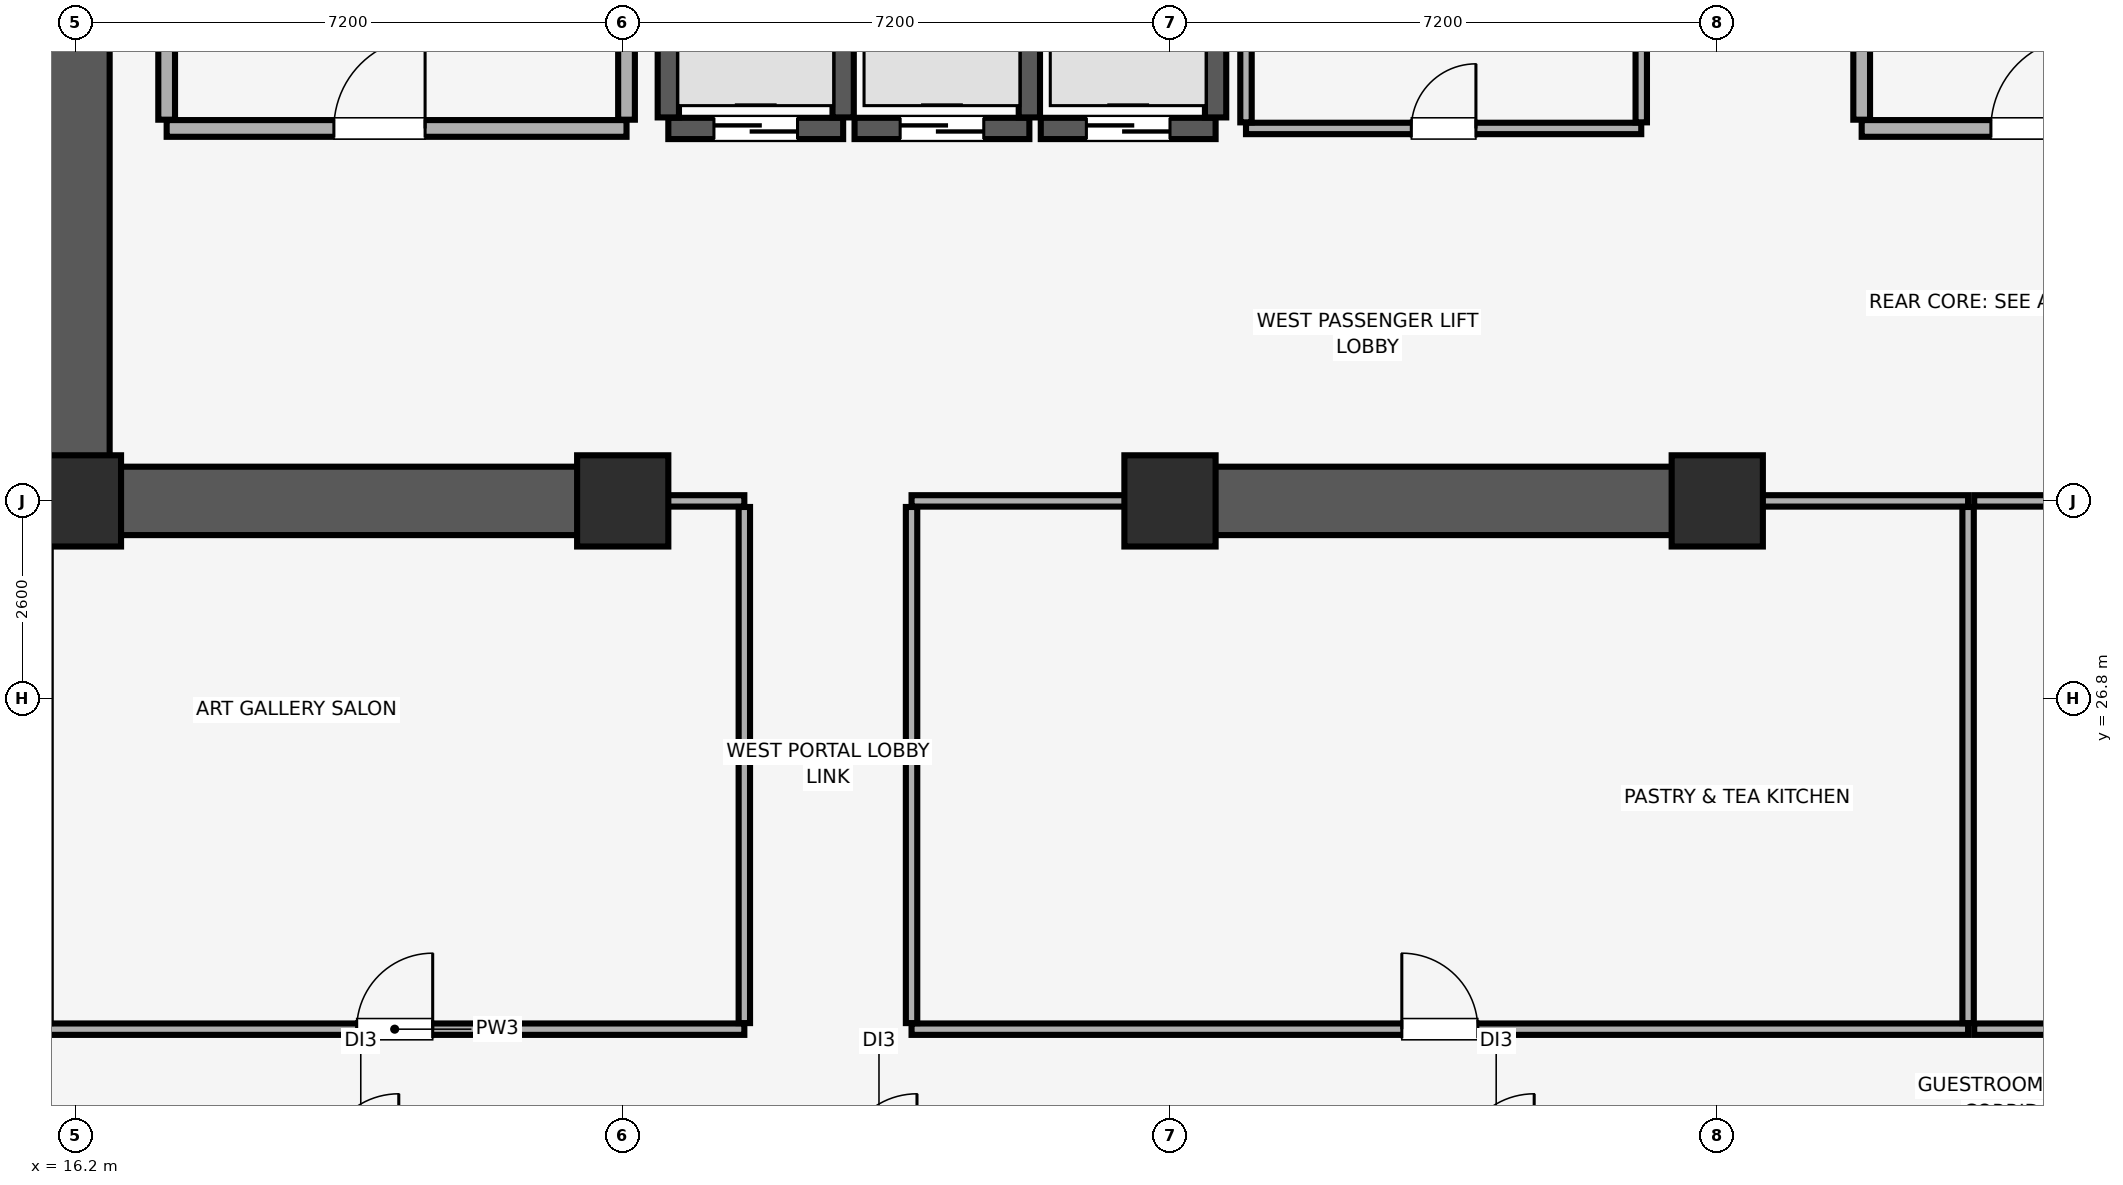
"""IFC4 building model, lengths in metres.
Left out: names, types, materials, properties, quantities, classifications, styles, units other than length and angle.
Written with IfcOpenShell. Run it as: python <this file> out.ifc"""

import sys

from ifc_helpers import new_model, si_unit, direction, frame, frame_2d, origin, origin_2d, place, context, subcontext, project, spatial, rectangle, extrude, element, fill, save


model = new_model("IFC4")
c1 = context("Model", 3, precision=1e-05, world=origin(), true_north=direction((0.0, 1.0)))
c2 = subcontext(c1, "Body", "Model", "MODEL_VIEW")
j1 = project(units=[si_unit("LENGTHUNIT", "METRE"), si_unit("PLANEANGLEUNIT", "RADIAN")], contexts=[c1])
p1 = place(None, origin())
s1 = spatial("IfcSite", under=j1, at=p1, CompositionType="ELEMENT")
p2 = place(p1, origin())
s2 = spatial("IfcBuilding", under=s1, at=p2, CompositionType="ELEMENT")
p3 = place(p2, frame((0.0, 0.0, 93.05)))
s3 = spatial("IfcBuildingStorey", under=s2, at=p3, CompositionType="ELEMENT", Elevation=93.05)
for number, where, z_axis, x_axis in (
    (1, (16.2, 29.4, 0.0), (0.0, 0.0, 1.0), (1.0, 0.0, 0.0)),
    (2, (23.4, 29.4, 0.0), (0.0, 0.0, 1.0), (1.0, 0.0, 0.0)),
    (3, (30.6, 29.4, 0.0), (0.0, 0.0, 1.0), (1.0, 0.0, 0.0)),
    (4, (37.8, 29.4, 0.0), (0.0, 0.0, 1.0), (1.0, 0.0, 0.0)),
):
    element("IfcColumn", number, at=place(p3, frame(where, z_axis=z_axis, x_axis=x_axis)), inside=s3, PredefinedType="COLUMN", context=c2, shape_type="SweptSolid", body=[
        extrude(rectangle(XDim=1.2, YDim=1.2, at=origin_2d()), origin(), (0.0, 0.0, 1.0), 3.51),
    ])
p4 = place(p3, frame((16.2, 29.4, 0.0), z_axis=(0.0, 0.0, 1.0), x_axis=(0.0, 1.0, 0.0)))
e5 = element("IfcWall", 5, at=p4, inside=s3, PredefinedType="SHEAR", context=c2, shape_type="SweptSolid", body=[
    extrude(rectangle(XDim=19.2, YDim=0.9, at=frame_2d((9.6, 0.0))), origin(), (0.0, 0.0, 1.0), 3.51),
])
p5 = place(p3, frame((16.655, 29.4, 0.0), z_axis=(0.0, 0.0, 1.0), x_axis=(1.0, 0.0, 0.0)))
e6 = element("IfcWall", 6, at=p5, inside=s3, PredefinedType="SHEAR", context=c2, shape_type="SweptSolid", body=[
    extrude(rectangle(XDim=6.945, YDim=0.9, at=frame_2d((3.473, 0.0))), origin(), (0.0, 0.0, 1.0), 3.51),
])
p6 = place(p3, frame((30.4, 29.4, 0.0), z_axis=(0.0, 0.0, 1.0), x_axis=(1.0, 0.0, 0.0)))
e7 = element("IfcWall", 7, at=p6, inside=s3, PredefinedType="SHEAR", context=c2, shape_type="SweptSolid", body=[
    extrude(rectangle(XDim=7.6, YDim=0.9, at=frame_2d((3.8, 0.0))), origin(), (0.0, 0.0, 1.0), 3.51),
])
p7 = place(p3, frame((24.0, 34.3, 0.0), z_axis=(0.0, 0.0, 1.0), x_axis=(1.0, 0.0, 0.0)))
e8 = element("IfcWall", 8, at=p7, inside=s3, PredefinedType="SHEAR", context=c2, shape_type="SweptSolid", body=[
    extrude(rectangle(XDim=2.3, YDim=0.28, at=frame_2d((1.15, 0.0))), origin(), (0.0, 0.0, 1.0), 3.51),
])
p8 = place(p7, frame((0.6, 0.0, 0.0)))
e9 = element("IfcOpeningElement", 9, at=p8, cuts=e8, PredefinedType="OPENING", context=c2, shape_type="SweptSolid", body=[
    extrude(rectangle(XDim=1.1, YDim=2.2, at=frame_2d((0.55, 1.1))), frame((0.0, 0.15, 0.0), z_axis=(0.0, -1.0, 0.0), x_axis=(1.0, 0.0, 0.0)), (0.0, 0.0, 1.0), 0.3),
])
for number, where, z_axis, x_axis in (
    (10, (24.0, 34.445, 0.0), (0.0, 0.0, 1.0), (0.0, 1.0, 0.0)),
    (11, (26.3, 34.445, 0.0), (0.0, 0.0, 1.0), (0.0, 1.0, 0.0)),
):
    element("IfcWall", number, at=place(p3, frame(where, z_axis=z_axis, x_axis=x_axis)), inside=s3, PredefinedType="SHEAR", context=c2, shape_type="SweptSolid", body=[
        extrude(rectangle(XDim=2.01, YDim=0.28, at=frame_2d((1.005, 0.0))), origin(), (0.0, 0.0, 1.0), 3.51),
    ])
p9 = place(p3, frame((26.45, 34.3, 0.0), z_axis=(0.0, 0.0, 1.0), x_axis=(1.0, 0.0, 0.0)))
e12 = element("IfcWall", 12, at=p9, inside=s3, PredefinedType="SHEAR", context=c2, shape_type="SweptSolid", body=[
    extrude(rectangle(XDim=2.3, YDim=0.28, at=frame_2d((1.15, 0.0))), origin(), (0.0, 0.0, 1.0), 3.51),
])
p10 = place(p9, frame((0.6, 0.0, 0.0)))
e13 = element("IfcOpeningElement", 13, at=p10, cuts=e12, PredefinedType="OPENING", context=c2, shape_type="SweptSolid", body=[
    extrude(rectangle(XDim=1.1, YDim=2.2, at=frame_2d((0.55, 1.1))), frame((0.0, 0.15, 0.0), z_axis=(0.0, -1.0, 0.0), x_axis=(1.0, 0.0, 0.0)), (0.0, 0.0, 1.0), 0.3),
])
p11 = place(p3, frame((28.75, 34.445, 0.0), z_axis=(0.0, 0.0, 1.0), x_axis=(0.0, 1.0, 0.0)))
e14 = element("IfcWall", 14, at=p11, inside=s3, PredefinedType="SHEAR", context=c2, shape_type="SweptSolid", body=[
    extrude(rectangle(XDim=2.01, YDim=0.28, at=frame_2d((1.005, 0.0))), origin(), (0.0, 0.0, 1.0), 3.51),
])
p12 = place(p3, frame((28.9, 34.3, 0.0), z_axis=(0.0, 0.0, 1.0), x_axis=(1.0, 0.0, 0.0)))
e15 = element("IfcWall", 15, at=p12, inside=s3, PredefinedType="SHEAR", context=c2, shape_type="SweptSolid", body=[
    extrude(rectangle(XDim=2.3, YDim=0.28, at=frame_2d((1.15, 0.0))), origin(), (0.0, 0.0, 1.0), 3.51),
])
p13 = place(p12, frame((0.6, 0.0, 0.0)))
e16 = element("IfcOpeningElement", 16, at=p13, cuts=e15, PredefinedType="OPENING", context=c2, shape_type="SweptSolid", body=[
    extrude(rectangle(XDim=1.1, YDim=2.2, at=frame_2d((0.55, 1.1))), frame((0.0, 0.15, 0.0), z_axis=(0.0, -1.0, 0.0), x_axis=(1.0, 0.0, 0.0)), (0.0, 0.0, 1.0), 0.3),
])
p14 = place(p3, frame((31.2, 34.445, 0.0), z_axis=(0.0, 0.0, 1.0), x_axis=(0.0, 1.0, 0.0)))
e17 = element("IfcWall", 17, at=p14, inside=s3, PredefinedType="SHEAR", context=c2, shape_type="SweptSolid", body=[
    extrude(rectangle(XDim=2.01, YDim=0.28, at=frame_2d((1.005, 0.0))), origin(), (0.0, 0.0, 1.0), 3.51),
])
p15 = place(p3, frame((17.4, 34.3, 0.0), z_axis=(0.0, 0.0, 1.0), x_axis=(1.0, 0.0, 0.0)))
e18 = element("IfcWall", 18, at=p15, inside=s3, PredefinedType="PARTITIONING", context=c2, shape_type="SweptSolid", body=[
    extrude(rectangle(XDim=6.05, YDim=0.22, at=frame_2d((3.025, 0.0))), origin(), (0.0, 0.0, 1.0), 3.51),
])
p16 = place(p15, frame((2.2, 0.0, 0.0)))
e19 = element("IfcOpeningElement", 19, at=p16, cuts=e18, PredefinedType="OPENING", context=c2, shape_type="SweptSolid", body=[
    extrude(rectangle(XDim=1.2, YDim=2.15, at=frame_2d((0.6, 1.075))), frame((0.0, 0.12, 0.0), z_axis=(0.0, -1.0, 0.0), x_axis=(1.0, 0.0, 0.0)), (0.0, 0.0, 1.0), 0.24),
])
p17 = place(p3, frame((17.4, 34.415, 0.0), z_axis=(0.0, 0.0, 1.0), x_axis=(0.0, 1.0, 0.0)))
e20 = element("IfcWall", 20, at=p17, inside=s3, PredefinedType="PARTITIONING", context=c2, shape_type="SweptSolid", body=[
    extrude(rectangle(XDim=5.43, YDim=0.22, at=frame_2d((2.715, 0.0))), origin(), (0.0, 0.0, 1.0), 3.51),
])
p18 = place(p3, frame((23.45, 34.415, 0.0), z_axis=(0.0, 0.0, 1.0), x_axis=(0.0, 1.0, 0.0)))
e21 = element("IfcWall", 21, at=p18, inside=s3, PredefinedType="PARTITIONING", context=c2, shape_type="SweptSolid", body=[
    extrude(rectangle(XDim=5.64, YDim=0.22, at=frame_2d((2.82, 0.0))), origin(), (0.0, 0.0, 1.0), 3.51),
])
p19 = place(p3, frame((39.7, 34.3, 0.0), z_axis=(0.0, 0.0, 1.0), x_axis=(1.0, 0.0, 0.0)))
e22 = element("IfcWall", 22, at=p19, inside=s3, PredefinedType="PARTITIONING", context=c2, shape_type="SweptSolid", body=[
    extrude(rectangle(XDim=4.6, YDim=0.22, at=frame_2d((2.3, 0.0))), origin(), (0.0, 0.0, 1.0), 3.51),
])
p20 = place(p19, frame((1.7, 0.0, 0.0)))
e23 = element("IfcOpeningElement", 23, at=p20, cuts=e22, PredefinedType="OPENING", context=c2, shape_type="SweptSolid", body=[
    extrude(rectangle(XDim=1.2, YDim=2.15, at=frame_2d((0.6, 1.075))), frame((0.0, 0.12, 0.0), z_axis=(0.0, -1.0, 0.0), x_axis=(1.0, 0.0, 0.0)), (0.0, 0.0, 1.0), 0.24),
])
p21 = place(p3, frame((39.7, 34.415, 0.0), z_axis=(0.0, 0.0, 1.0), x_axis=(0.0, 1.0, 0.0)))
e24 = element("IfcWall", 24, at=p21, inside=s3, PredefinedType="PARTITIONING", context=c2, shape_type="SweptSolid", body=[
    extrude(rectangle(XDim=5.785, YDim=0.22, at=frame_2d((2.893, 0.0))), origin(), (0.0, 0.0, 1.0), 3.51),
])
p22 = place(p3, frame((31.6, 34.3, 0.0), z_axis=(0.0, 0.0, 1.0), x_axis=(1.0, 0.0, 0.0)))
e25 = element("IfcWall", 25, at=p22, inside=s3, PredefinedType="PARTITIONING", context=c2, shape_type="SweptSolid", body=[
    extrude(rectangle(XDim=5.2, YDim=0.15, at=frame_2d((2.6, 0.0))), origin(), (0.0, 0.0, 1.0), 3.51),
])
p23 = place(p22, frame((2.175, 0.0, 0.0)))
e26 = element("IfcOpeningElement", 26, at=p23, cuts=e25, PredefinedType="OPENING", context=c2, shape_type="SweptSolid", body=[
    extrude(rectangle(XDim=0.85, YDim=2.1, at=frame_2d((0.425, 1.05))), frame((0.0, 0.085, 0.0), z_axis=(0.0, -1.0, 0.0), x_axis=(1.0, 0.0, 0.0)), (0.0, 0.0, 1.0), 0.17),
])
for number, where, z_axis, x_axis in (
    (27, (31.6, 34.38, 0.0), (0.0, 0.0, 1.0), (0.0, 1.0, 0.0)),
    (28, (36.8, 34.38, 0.0), (0.0, 0.0, 1.0), (0.0, 1.0, 0.0)),
):
    element("IfcWall", number, at=place(p3, frame(where, z_axis=z_axis, x_axis=x_axis)), inside=s3, PredefinedType="PARTITIONING", context=c2, shape_type="SweptSolid", body=[
        extrude(rectangle(XDim=4.94, YDim=0.15, at=frame_2d((2.47, 0.0))), origin(), (0.0, 0.0, 1.0), 3.51),
    ])
p24 = place(p3, frame((15.8, 22.45, 0.0), z_axis=(0.0, 0.0, 1.0), x_axis=(1.0, 0.0, 0.0)))
e29 = element("IfcWall", 29, at=p24, inside=s3, PredefinedType="PARTITIONING", context=c2, shape_type="SweptSolid", body=[
    extrude(rectangle(XDim=9.2, YDim=0.15, at=frame_2d((4.6, 0.0))), origin(), (0.0, 0.0, 1.0), 3.51),
])
p25 = place(p24, frame((4.1, 0.0, 0.0)))
e30 = element("IfcOpeningElement", 30, at=p25, cuts=e29, PredefinedType="OPENING", context=c2, shape_type="SweptSolid", body=[
    extrude(rectangle(XDim=1.0, YDim=2.15, at=frame_2d((0.5, 1.075))), frame((0.0, 0.085, 0.0), z_axis=(0.0, -1.0, 0.0), x_axis=(1.0, 0.0, 0.0)), (0.0, 0.0, 1.0), 0.17),
])
p26 = place(p3, frame((23.61, 29.4, 0.0), z_axis=(0.0, 0.0, 1.0), x_axis=(1.0, 0.0, 0.0)))
e31 = element("IfcWall", 31, at=p26, inside=s3, PredefinedType="PARTITIONING", context=c2, shape_type="SweptSolid", body=[
    extrude(rectangle(XDim=1.39, YDim=0.15, at=frame_2d((0.695, 0.0))), origin(), (0.0, 0.0, 1.0), 2.41),
])
p27 = place(p3, frame((25.0, 22.53, 0.0), z_axis=(0.0, 0.0, 1.0), x_axis=(0.0, 1.0, 0.0)))
e32 = element("IfcWall", 32, at=p27, inside=s3, PredefinedType="PARTITIONING", context=c2, shape_type="SweptSolid", body=[
    extrude(rectangle(XDim=6.79, YDim=0.15, at=frame_2d((3.395, 0.0))), origin(), (0.0, 0.0, 1.0), 3.51),
])
p28 = place(p3, frame((27.2, 22.45, 0.0), z_axis=(0.0, 0.0, 1.0), x_axis=(1.0, 0.0, 0.0)))
e33 = element("IfcWall", 33, at=p28, inside=s3, PredefinedType="PARTITIONING", context=c2, shape_type="SweptSolid", body=[
    extrude(rectangle(XDim=13.9, YDim=0.15, at=frame_2d((6.95, 0.0))), origin(), (0.0, 0.0, 1.0), 3.51),
])
p29 = place(p28, frame((6.45, 0.0, 0.0)))
e34 = element("IfcOpeningElement", 34, at=p29, cuts=e33, PredefinedType="OPENING", context=c2, shape_type="SweptSolid", body=[
    extrude(rectangle(XDim=1.0, YDim=2.15, at=frame_2d((0.5, 1.075))), frame((0.0, 0.085, 0.0), z_axis=(0.0, -1.0, 0.0), x_axis=(1.0, 0.0, 0.0)), (0.0, 0.0, 1.0), 0.17),
])
p30 = place(p3, frame((27.2, 29.4, 0.0), z_axis=(0.0, 0.0, 1.0), x_axis=(1.0, 0.0, 0.0)))
e35 = element("IfcWall", 35, at=p30, inside=s3, PredefinedType="PARTITIONING", context=c2, shape_type="SweptSolid", body=[
    extrude(rectangle(XDim=3.19, YDim=0.15, at=frame_2d((1.595, 0.0))), origin(), (0.0, 0.0, 1.0), 2.41),
])
p31 = place(p3, frame((38.01, 29.4, 0.0), z_axis=(0.0, 0.0, 1.0), x_axis=(1.0, 0.0, 0.0)))
e36 = element("IfcWall", 36, at=p31, inside=s3, PredefinedType="PARTITIONING", context=c2, shape_type="SweptSolid", body=[
    extrude(rectangle(XDim=3.09, YDim=0.15, at=frame_2d((1.545, 0.0))), origin(), (0.0, 0.0, 1.0), 2.41),
])
p32 = place(p3, frame((27.2, 22.53, 0.0), z_axis=(0.0, 0.0, 1.0), x_axis=(0.0, 1.0, 0.0)))
e37 = element("IfcWall", 37, at=p32, inside=s3, PredefinedType="PARTITIONING", context=c2, shape_type="SweptSolid", body=[
    extrude(rectangle(XDim=6.79, YDim=0.15, at=frame_2d((3.395, 0.0))), origin(), (0.0, 0.0, 1.0), 2.977),
])
p33 = place(p3, frame((41.1, 22.53, 0.0), z_axis=(0.0, 0.0, 1.0), x_axis=(0.0, 1.0, 0.0)))
e38 = element("IfcWall", 38, at=p33, inside=s3, PredefinedType="PARTITIONING", context=c2, shape_type="SweptSolid", body=[
    extrude(rectangle(XDim=6.79, YDim=0.15, at=frame_2d((3.395, 0.0))), origin(), (0.0, 0.0, 1.0), 3.51),
])
p34 = place(p3, frame((41.18, 22.45, 0.0), z_axis=(0.0, 0.0, 1.0), x_axis=(1.0, 0.0, 0.0)))
e39 = element("IfcWall", 39, at=p34, inside=s3, PredefinedType="PARTITIONING", context=c2, shape_type="SweptSolid", body=[
    extrude(rectangle(XDim=15.62, YDim=0.15, at=frame_2d((7.81, 0.0))), origin(), (0.0, 0.0, 1.0), 3.51),
])
p35 = place(p34, frame((7.27, 0.0, 0.0)))
e40 = element("IfcOpeningElement", 40, at=p35, cuts=e39, PredefinedType="OPENING", context=c2, shape_type="SweptSolid", body=[
    extrude(rectangle(XDim=1.0, YDim=2.15, at=frame_2d((0.5, 1.075))), frame((0.0, 0.085, 0.0), z_axis=(0.0, -1.0, 0.0), x_axis=(1.0, 0.0, 0.0)), (0.0, 0.0, 1.0), 0.17),
])
p36 = place(p3, frame((41.18, 29.4, 0.0), z_axis=(0.0, 0.0, 1.0), x_axis=(1.0, 0.0, 0.0)))
e41 = element("IfcWall", 41, at=p36, inside=s3, PredefinedType="PARTITIONING", context=c2, shape_type="SweptSolid", body=[
    extrude(rectangle(XDim=4.81, YDim=0.15, at=frame_2d((2.405, 0.0))), origin(), (0.0, 0.0, 1.0), 2.41),
])
p37 = place(p8, origin())
e42 = element("IfcDoor", 42, at=p37, inside=s3, OperationType="DOUBLE_DOOR_SLIDING", PredefinedType="DOOR", context=c2, shape_type="SweptSolid", body=[
    extrude(rectangle(XDim=1.1, YDim=2.2, at=frame_2d((0.55, 1.1))), frame((0.0, 0.025, 0.0), z_axis=(0.0, -1.0, 0.0), x_axis=(1.0, 0.0, 0.0)), (0.0, 0.0, 1.0), 0.05),
])
fill(e9, e42)
p38 = place(p10, origin())
e43 = element("IfcDoor", 43, at=p38, inside=s3, OperationType="DOUBLE_DOOR_SLIDING", PredefinedType="DOOR", context=c2, shape_type="SweptSolid", body=[
    extrude(rectangle(XDim=1.1, YDim=2.2, at=frame_2d((0.55, 1.1))), frame((0.0, 0.025, 0.0), z_axis=(0.0, -1.0, 0.0), x_axis=(1.0, 0.0, 0.0)), (0.0, 0.0, 1.0), 0.05),
])
fill(e13, e43)
p39 = place(p13, origin())
e44 = element("IfcDoor", 44, at=p39, inside=s3, OperationType="DOUBLE_DOOR_SLIDING", PredefinedType="DOOR", context=c2, shape_type="SweptSolid", body=[
    extrude(rectangle(XDim=1.1, YDim=2.2, at=frame_2d((0.55, 1.1))), frame((0.0, 0.025, 0.0), z_axis=(0.0, -1.0, 0.0), x_axis=(1.0, 0.0, 0.0)), (0.0, 0.0, 1.0), 0.05),
])
fill(e16, e44)
p40 = place(p16, origin())
e45 = element("IfcDoor", 45, at=p40, inside=s3, OperationType="SINGLE_SWING_RIGHT", PredefinedType="DOOR", context=c2, shape_type="SweptSolid", body=[
    extrude(rectangle(XDim=1.2, YDim=2.15, at=frame_2d((0.6, 1.075))), frame((0.0, 0.025, 0.0), z_axis=(0.0, -1.0, 0.0), x_axis=(1.0, 0.0, 0.0)), (0.0, 0.0, 1.0), 0.05),
])
fill(e19, e45)
p41 = place(p20, origin())
e46 = element("IfcDoor", 46, at=p41, inside=s3, OperationType="SINGLE_SWING_RIGHT", PredefinedType="DOOR", context=c2, shape_type="SweptSolid", body=[
    extrude(rectangle(XDim=1.2, YDim=2.15, at=frame_2d((0.6, 1.075))), frame((0.0, 0.025, 0.0), z_axis=(0.0, -1.0, 0.0), x_axis=(1.0, 0.0, 0.0)), (0.0, 0.0, 1.0), 0.05),
])
fill(e23, e46)
p42 = place(p23, origin())
e47 = element("IfcDoor", 47, at=p42, inside=s3, OperationType="SINGLE_SWING_RIGHT", PredefinedType="DOOR", context=c2, shape_type="SweptSolid", body=[
    extrude(rectangle(XDim=0.85, YDim=2.1, at=frame_2d((0.425, 1.05))), frame((0.0, 0.025, 0.0), z_axis=(0.0, -1.0, 0.0), x_axis=(1.0, 0.0, 0.0)), (0.0, 0.0, 1.0), 0.05),
])
fill(e26, e47)
p43 = place(p25, origin())
e48 = element("IfcDoor", 48, at=p43, inside=s3, OperationType="SINGLE_SWING_RIGHT", PredefinedType="DOOR", context=c2, shape_type="SweptSolid", body=[
    extrude(rectangle(XDim=1.0, YDim=2.15, at=frame_2d((0.5, 1.075))), frame((0.0, 0.025, 0.0), z_axis=(0.0, -1.0, 0.0), x_axis=(1.0, 0.0, 0.0)), (0.0, 0.0, 1.0), 0.05),
])
fill(e30, e48)
p44 = place(p29, origin())
e49 = element("IfcDoor", 49, at=p44, inside=s3, OperationType="SINGLE_SWING_LEFT", PredefinedType="DOOR", context=c2, shape_type="SweptSolid", body=[
    extrude(rectangle(XDim=1.0, YDim=2.15, at=frame_2d((0.5, 1.075))), frame((0.0, 0.025, 0.0), z_axis=(0.0, -1.0, 0.0), x_axis=(1.0, 0.0, 0.0)), (0.0, 0.0, 1.0), 0.05),
])
fill(e34, e49)
save(model, sys.argv[1])
